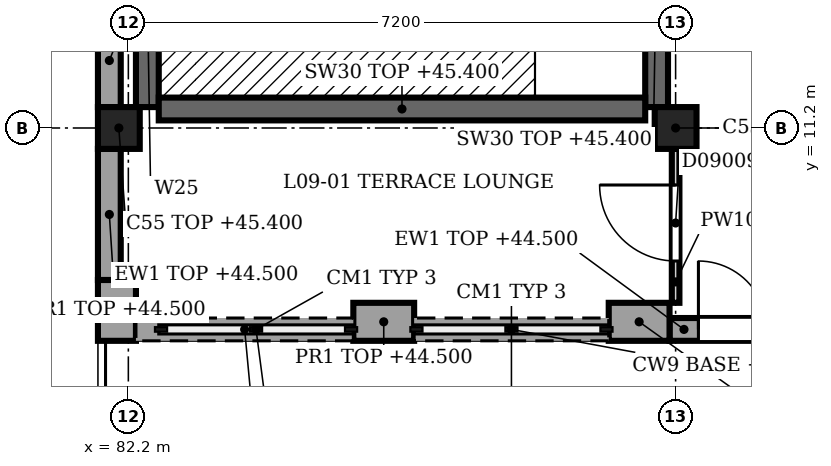
"""IFC4 building model, lengths in metres.
Left out: names, types, materials, properties, quantities, classifications, styles, units other than length and angle.
Written with IfcOpenShell. Run it as: python <this file> out.ifc"""

import sys

from ifc_helpers import new_model, si_unit, direction, frame, frame_2d, origin, origin_2d, place, context, subcontext, project, spatial, rectangle, extrude, element, fill, save


model = new_model("IFC4")
c1 = context("Model", 3, precision=1e-05, world=origin(), true_north=direction((0.0, 1.0)))
c2 = subcontext(c1, "Body", "Model", "MODEL_VIEW")
j1 = project(units=[si_unit("LENGTHUNIT", "METRE"), si_unit("PLANEANGLEUNIT", "RADIAN")], contexts=[c1])
p1 = place(None, origin())
s1 = spatial("IfcSite", under=j1, at=p1, CompositionType="ELEMENT")
p2 = place(p1, origin())
s2 = spatial("IfcBuilding", under=s1, at=p2, CompositionType="ELEMENT")
p3 = place(p2, frame((0.0, 0.0, 41.4)))
s3 = spatial("IfcBuildingStorey", under=s2, at=p3, CompositionType="ELEMENT", Elevation=41.4)
for number, where, z_axis, x_axis in (
    (1, (82.075, 11.2, 0.0), (0.0, 0.0, 1.0), (1.0, 0.0, 0.0)),
    (2, (89.4, 11.2, 0.0), (0.0, 0.0, 1.0), (1.0, 0.0, 0.0)),
):
    element("IfcColumn", number, at=place(p3, frame(where, z_axis=z_axis, x_axis=x_axis)), inside=s3, PredefinedType="COLUMN", context=c2, shape_type="SweptSolid", body=[
        extrude(rectangle(XDim=0.55, YDim=0.55, at=origin_2d()), origin(), (0.0, 0.0, 1.0), 4.0),
    ])
p4 = place(p3, frame((82.05, 8.4, 0.0), z_axis=(0.0, 0.0, 1.0), x_axis=(0.0, 1.0, 0.0)))
e3 = element("IfcWall", 3, at=p4, inside=s3, PredefinedType="SOLIDWALL", context=c2, shape_type="SweptSolid", body=[
    extrude(rectangle(XDim=0.8, YDim=0.5, at=frame_2d((0.4, 0.0))), origin(), (0.0, 0.0, 1.0), 3.1),
])
p5 = place(p3, frame((81.95, 9.2, 0.0), z_axis=(0.0, 0.0, 1.0), x_axis=(0.0, 1.0, 0.0)))
e4 = element("IfcWall", 4, at=p5, inside=s3, PredefinedType="SOLIDWALL", context=c2, shape_type="SweptSolid", body=[
    extrude(rectangle(XDim=1.725, YDim=0.3, at=frame_2d((0.863, 0.0))), origin(), (0.0, 0.0, 1.0), 3.1),
])
p6 = place(p3, frame((81.95, 11.475, 0.0), z_axis=(0.0, 0.0, 1.0), x_axis=(0.0, 1.0, 0.0)))
e5 = element("IfcWall", 5, at=p6, inside=s3, PredefinedType="SOLIDWALL", context=c2, shape_type="SweptSolid", body=[
    extrude(rectangle(XDim=2.925, YDim=0.3, at=frame_2d((1.462, 0.0))), origin(), (0.0, 0.0, 1.0), 3.1),
])
p7 = place(p6, frame((1.225, 0.0, 1.2)))
e6 = element("IfcOpeningElement", 6, at=p7, cuts=e5, PredefinedType="OPENING", context=c2, shape_type="SweptSolid", body=[
    extrude(rectangle(XDim=0.6, YDim=1.8, at=frame_2d((0.3, 0.9))), frame((0.0, 0.16, 0.0), z_axis=(0.0, -1.0, 0.0), x_axis=(1.0, 0.0, 0.0)), (0.0, 0.0, 1.0), 0.32),
])
for number, where, z_axis, x_axis in (
    (7, (89.32, 8.65, 0.0), (0.0, 0.0, 1.0), (-1.0, 0.0, 0.0)),
    (8, (85.96, 8.65, 0.0), (0.0, 0.0, 1.0), (-1.0, 0.0, 0.0)),
):
    element("IfcWall", number, at=place(p3, frame(where, z_axis=z_axis, x_axis=x_axis)), inside=s3, PredefinedType="SOLIDWALL", context=c2, shape_type="SweptSolid", body=[
        extrude(rectangle(XDim=0.8, YDim=0.5, at=frame_2d((0.4, 0.0))), origin(), (0.0, 0.0, 1.0), 3.1),
    ])
p8 = place(p3, frame((91.88, 8.55, 0.0), z_axis=(0.0, 0.0, 1.0), x_axis=(-1.0, 0.0, 0.0)))
e9 = element("IfcWall", 9, at=p8, inside=s3, PredefinedType="SOLIDWALL", context=c2, shape_type="SweptSolid", body=[
    extrude(rectangle(XDim=2.56, YDim=0.3, at=frame_2d((1.28, 0.0))), origin(), (0.0, 0.0, 1.0), 3.1),
])
p9 = place(p8, frame((0.38, 0.0, 0.0)))
e10 = element("IfcOpeningElement", 10, at=p9, cuts=e9, PredefinedType="OPENING", context=c2, shape_type="SweptSolid", body=[
    extrude(rectangle(XDim=1.8, YDim=2.4, at=frame_2d((0.9, 1.2))), frame((0.0, 0.16, 0.0), z_axis=(0.0, -1.0, 0.0), x_axis=(1.0, 0.0, 0.0)), (0.0, 0.0, 1.0), 0.32),
])
p10 = place(p3, frame((88.52, 8.55, 0.0), z_axis=(0.0, 0.0, 1.0), x_axis=(-1.0, 0.0, 0.0)))
e11 = element("IfcWall", 11, at=p10, inside=s3, PredefinedType="SOLIDWALL", context=c2, shape_type="SweptSolid", body=[
    extrude(rectangle(XDim=2.56, YDim=0.3, at=frame_2d((1.28, 0.0))), origin(), (0.0, 0.0, 1.0), 0.45),
])
p11 = place(p3, frame((85.16, 8.55, 0.0), z_axis=(0.0, 0.0, 1.0), x_axis=(-1.0, 0.0, 0.0)))
e12 = element("IfcWall", 12, at=p11, inside=s3, PredefinedType="SOLIDWALL", context=c2, shape_type="SweptSolid", body=[
    extrude(rectangle(XDim=2.86, YDim=0.3, at=frame_2d((1.43, 0.0))), origin(), (0.0, 0.0, 1.0), 0.45),
])
p12 = place(p3, frame((89.15, 11.475, 0.0), z_axis=(0.0, 0.0, 1.0), x_axis=(0.0, 1.0, 0.0)))
e13 = element("IfcWall", 13, at=p12, inside=s3, PredefinedType="SHEAR", context=c2, shape_type="SweptSolid", body=[
    extrude(rectangle(XDim=6.65, YDim=0.3, at=frame_2d((3.325, 0.0))), origin(), (0.0, 0.0, 1.0), 4.0),
])
p13 = place(p12, frame((4.325, 0.0, 0.0)))
e14 = element("IfcOpeningElement", 14, at=p13, cuts=e13, PredefinedType="OPENING", context=c2, shape_type="SweptSolid", body=[
    extrude(rectangle(XDim=1.2, YDim=2.1, at=frame_2d((0.6, 1.05))), frame((0.0, 0.16, 0.0), z_axis=(0.0, -1.0, 0.0), x_axis=(1.0, 0.0, 0.0)), (0.0, 0.0, 1.0), 0.32),
])
p14 = place(p3, frame((82.45, 11.475, 0.0), z_axis=(0.0, 0.0, 1.0), x_axis=(0.0, 1.0, 0.0)))
e15 = element("IfcWall", 15, at=p14, inside=s3, PredefinedType="SHEAR", context=c2, shape_type="SweptSolid", body=[
    extrude(rectangle(XDim=6.65, YDim=0.3, at=frame_2d((3.325, 0.0))), origin(), (0.0, 0.0, 1.0), 4.0),
])
p15 = place(p14, frame((1.225, 0.0, 1.2)))
e16 = element("IfcOpeningElement", 16, at=p15, cuts=e15, PredefinedType="OPENING", context=c2, shape_type="SweptSolid", body=[
    extrude(rectangle(XDim=0.6, YDim=1.8, at=frame_2d((0.3, 0.9))), frame((0.0, 0.16, 0.0), z_axis=(0.0, -1.0, 0.0), x_axis=(1.0, 0.0, 0.0)), (0.0, 0.0, 1.0), 0.32),
])
p16 = place(p3, frame((82.6, 11.45, 0.0), z_axis=(0.0, 0.0, 1.0), x_axis=(1.0, 0.0, 0.0)))
e17 = element("IfcWall", 17, at=p16, inside=s3, PredefinedType="SHEAR", context=c2, shape_type="SweptSolid", body=[
    extrude(rectangle(XDim=6.4, YDim=0.3, at=frame_2d((3.2, 0.0))), origin(), (0.0, 0.0, 1.0), 4.0),
])
p17 = place(p3, frame((89.4, 8.9, 0.0), z_axis=(0.0, 0.0, 1.0), x_axis=(0.0, 1.0, 0.0)))
e18 = element("IfcWall", 18, at=p17, inside=s3, PredefinedType="PARTITIONING", context=c2, shape_type="SweptSolid", body=[
    extrude(rectangle(XDim=2.025, YDim=0.1, at=frame_2d((1.013, 0.0))), origin(), (0.0, 0.0, 1.0), 3.17),
])
p18 = place(p17, frame((0.55, 0.0, 0.0)))
e19 = element("IfcOpeningElement", 19, at=p18, cuts=e18, PredefinedType="OPENING", context=c2, shape_type="SweptSolid", body=[
    extrude(rectangle(XDim=1.0, YDim=2.1, at=frame_2d((0.5, 1.05))), frame((0.0, 0.06, 0.0), z_axis=(0.0, -1.0, 0.0), x_axis=(1.0, 0.0, 0.0)), (0.0, 0.0, 1.0), 0.12),
])
p19 = place(p9, origin())
e20 = element("IfcDoor", 20, at=p19, inside=s3, OperationType="SINGLE_SWING_LEFT", PredefinedType="DOOR", context=c2, shape_type="SweptSolid", body=[
    extrude(rectangle(XDim=1.8, YDim=2.4, at=frame_2d((0.9, 1.2))), frame((0.0, 0.025, 0.0), z_axis=(0.0, -1.0, 0.0), x_axis=(1.0, 0.0, 0.0)), (0.0, 0.0, 1.0), 0.05),
])
fill(e10, e20)
p20 = place(p18, origin())
e21 = element("IfcDoor", 21, at=p20, inside=s3, OperationType="SINGLE_SWING_RIGHT", PredefinedType="DOOR", context=c2, shape_type="SweptSolid", body=[
    extrude(rectangle(XDim=1.0, YDim=2.1, at=frame_2d((0.5, 1.05))), frame((0.0, 0.025, 0.0), z_axis=(0.0, -1.0, 0.0), x_axis=(1.0, 0.0, 0.0)), (0.0, 0.0, 1.0), 0.05),
])
fill(e19, e21)
save(model, sys.argv[1])
